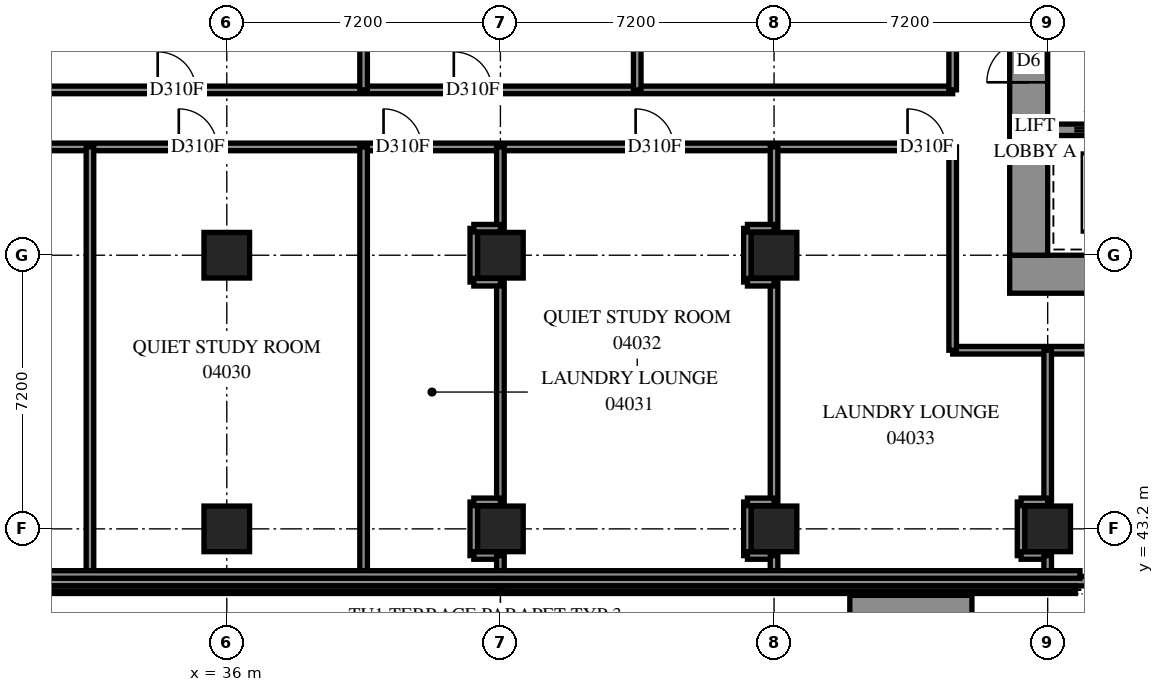
"""IFC4 building model, lengths in metres.
Left out: names, types, materials, properties, quantities, classifications, styles, units other than length and angle.
Written with IfcOpenShell. Run it as: python <this file> out.ifc"""

import sys

from ifc_helpers import new_model, si_unit, direction, frame, frame_2d, origin, origin_2d, place, context, subcontext, project, spatial, polyline, rectangle, outline, extrude, element, fill, save


model = new_model("IFC4")
c1 = context("Model", 3, precision=1e-05, world=origin(), true_north=direction((0.0, 1.0)))
c2 = subcontext(c1, "Body", "Model", "MODEL_VIEW")
j1 = project(units=[si_unit("LENGTHUNIT", "METRE"), si_unit("PLANEANGLEUNIT", "RADIAN")], contexts=[c1])
p1 = place(None, origin())
s1 = spatial("IfcSite", under=j1, at=p1, CompositionType="ELEMENT")
p2 = place(p1, origin())
s2 = spatial("IfcBuilding", under=s1, at=p2, CompositionType="ELEMENT")
p3 = place(p2, frame((0.0, 0.0, 18.6)))
s3 = spatial("IfcBuildingStorey", under=s2, at=p3, CompositionType="ELEMENT", Elevation=18.6)
for number, where, z_axis, x_axis in (
    (1, (36.0, 43.2, 0.0), (0.0, 0.0, 1.0), (1.0, 0.0, 0.0)),
    (2, (36.0, 50.4, 0.0), (0.0, 0.0, 1.0), (1.0, 0.0, 0.0)),
    (3, (43.2, 43.2, 0.0), (0.0, 0.0, 1.0), (1.0, 0.0, 0.0)),
    (4, (43.2, 50.4, 0.0), (0.0, 0.0, 1.0), (1.0, 0.0, 0.0)),
    (5, (50.4, 43.2, 0.0), (0.0, 0.0, 1.0), (1.0, 0.0, 0.0)),
    (6, (50.4, 50.4, 0.0), (0.0, 0.0, 1.0), (1.0, 0.0, 0.0)),
    (7, (57.6, 43.2, 0.0), (0.0, 0.0, 1.0), (1.0, 0.0, 0.0)),
):
    element("IfcColumn", number, at=place(p3, frame(where, z_axis=z_axis, x_axis=x_axis)), inside=s3, PredefinedType="COLUMN", context=c2, shape_type="SweptSolid", body=[
        extrude(rectangle(XDim=1.2, YDim=1.2, at=origin_2d()), origin(), (0.0, 0.0, 1.0), 3.8),
    ])
p4 = place(p3, frame((56.6, 49.9, -0.4), z_axis=(0.0, 0.0, 1.0), x_axis=(1.0, 0.0, 0.0)))
e8 = element("IfcWall", 8, at=p4, inside=s3, PredefinedType="SHEAR", context=c2, shape_type="SweptSolid", body=[
    extrude(rectangle(XDim=16.4, YDim=1.0, at=frame_2d((8.2, 0.0))), origin(), (0.0, 0.0, 1.0), 3.5),
])
p5 = place(p3, frame((57.1, 50.4, -0.4), z_axis=(0.0, 0.0, 1.0), x_axis=(0.0, 1.0, 0.0)))
e9 = element("IfcWall", 9, at=p5, inside=s3, PredefinedType="SHEAR", context=c2, shape_type="SweptSolid", body=[
    extrude(rectangle(XDim=14.4, YDim=1.0, at=frame_2d((7.2, 0.0))), origin(), (0.0, 0.0, 1.0), 3.5),
])
p6 = place(p5, frame((4.55, 0.0, 0.4)))
e10 = element("IfcOpeningElement", 10, at=p6, cuts=e9, PredefinedType="OPENING", context=c2, shape_type="SweptSolid", body=[
    extrude(rectangle(XDim=1.1, YDim=2.1, at=frame_2d((0.55, 1.05))), frame((0.0, 0.51, 0.0), z_axis=(0.0, -1.0, 0.0), x_axis=(1.0, 0.0, 0.0)), (0.0, 0.0, 1.0), 1.02),
])
p7 = place(p5, frame((11.35, 0.0, 0.4)))
e11 = element("IfcOpeningElement", 11, at=p7, cuts=e9, PredefinedType="OPENING", context=c2, shape_type="SweptSolid", body=[
    extrude(rectangle(XDim=1.1, YDim=2.1, at=frame_2d((0.55, 1.05))), frame((0.0, 0.51, 0.0), z_axis=(0.0, -1.0, 0.0), x_axis=(1.0, 0.0, 0.0)), (0.0, 0.0, 1.0), 1.02),
])
p8 = place(p3, frame((57.6, 53.7, 0.0), z_axis=(0.0, 0.0, 1.0), x_axis=(1.0, 0.0, 0.0)))
e12 = element("IfcWall", 12, at=p8, inside=s3, PredefinedType="SOLIDWALL", context=c2, shape_type="SweptSolid", body=[
    extrude(rectangle(XDim=14.4, YDim=0.3, at=frame_2d((7.2, 0.0))), origin(), (0.0, 0.0, 1.0), 3.8),
])
p9 = place(p8, frame((1.25, 0.0, 0.0)))
e13 = element("IfcOpeningElement", 13, at=p9, cuts=e12, PredefinedType="OPENING", context=c2, shape_type="SweptSolid", body=[
    extrude(rectangle(XDim=1.1, YDim=2.1, at=frame_2d((0.55, 1.05))), frame((0.0, 0.16, 0.0), z_axis=(0.0, -1.0, 0.0), x_axis=(1.0, 0.0, 0.0)), (0.0, 0.0, 1.0), 0.32),
])
p10 = place(p8, frame((4.85, 0.0, 0.0)))
e14 = element("IfcOpeningElement", 14, at=p10, cuts=e12, PredefinedType="OPENING", context=c2, shape_type="SweptSolid", body=[
    extrude(rectangle(XDim=1.1, YDim=2.1, at=frame_2d((0.55, 1.05))), frame((0.0, 0.16, 0.0), z_axis=(0.0, -1.0, 0.0), x_axis=(1.0, 0.0, 0.0)), (0.0, 0.0, 1.0), 0.32),
])
p11 = place(p8, frame((8.45, 0.0, 0.0)))
e15 = element("IfcOpeningElement", 15, at=p11, cuts=e12, PredefinedType="OPENING", context=c2, shape_type="SweptSolid", body=[
    extrude(rectangle(XDim=1.1, YDim=2.1, at=frame_2d((0.55, 1.05))), frame((0.0, 0.16, 0.0), z_axis=(0.0, -1.0, 0.0), x_axis=(1.0, 0.0, 0.0)), (0.0, 0.0, 1.0), 0.32),
])
p12 = place(p8, frame((12.05, 0.0, 0.0)))
e16 = element("IfcOpeningElement", 16, at=p12, cuts=e12, PredefinedType="OPENING", context=c2, shape_type="SweptSolid", body=[
    extrude(rectangle(XDim=1.1, YDim=2.1, at=frame_2d((0.55, 1.05))), frame((0.0, 0.16, 0.0), z_axis=(0.0, -1.0, 0.0), x_axis=(1.0, 0.0, 0.0)), (0.0, 0.0, 1.0), 0.32),
])
p13 = place(p3, frame((0.0, 53.25, 0.0), z_axis=(0.0, 0.0, 1.0), x_axis=(1.0, 0.0, 0.0)))
e17 = element("IfcWall", 17, at=p13, inside=s3, PredefinedType="PARTITIONING", context=c2, shape_type="SweptSolid", body=[
    extrude(rectangle(XDim=55.1, YDim=0.2, at=frame_2d((27.55, 0.0))), origin(), (0.0, 0.0, 1.0), 3.8),
])
p14 = place(p13, frame((8.669, 0.0, 0.0)))
e18 = element("IfcOpeningElement", 18, at=p14, cuts=e17, PredefinedType="OPENING", context=c2, shape_type="SweptSolid", body=[
    extrude(rectangle(XDim=1.0, YDim=2.1, at=frame_2d((0.5, 1.05))), frame((0.0, 0.11, 0.0), z_axis=(0.0, -1.0, 0.0), x_axis=(1.0, 0.0, 0.0)), (0.0, 0.0, 1.0), 0.22),
])
p15 = place(p13, frame((11.635, 0.0, 0.0)))
e19 = element("IfcOpeningElement", 19, at=p15, cuts=e17, PredefinedType="OPENING", context=c2, shape_type="SweptSolid", body=[
    extrude(rectangle(XDim=1.0, YDim=2.1, at=frame_2d((0.5, 1.05))), frame((0.0, 0.11, 0.0), z_axis=(0.0, -1.0, 0.0), x_axis=(1.0, 0.0, 0.0)), (0.0, 0.0, 1.0), 0.22),
])
p16 = place(p13, frame((16.165, 0.0, 0.0)))
e20 = element("IfcOpeningElement", 20, at=p16, cuts=e17, PredefinedType="OPENING", context=c2, shape_type="SweptSolid", body=[
    extrude(rectangle(XDim=1.0, YDim=2.1, at=frame_2d((0.5, 1.05))), frame((0.0, 0.11, 0.0), z_axis=(0.0, -1.0, 0.0), x_axis=(1.0, 0.0, 0.0)), (0.0, 0.0, 1.0), 0.22),
])
p17 = place(p13, frame((20.337, 0.0, 0.0)))
e21 = element("IfcOpeningElement", 21, at=p17, cuts=e17, PredefinedType="OPENING", context=c2, shape_type="SweptSolid", body=[
    extrude(rectangle(XDim=1.0, YDim=2.1, at=frame_2d((0.5, 1.05))), frame((0.0, 0.11, 0.0), z_axis=(0.0, -1.0, 0.0), x_axis=(1.0, 0.0, 0.0)), (0.0, 0.0, 1.0), 0.22),
])
p18 = place(p13, frame((27.538, 0.0, 0.0)))
e22 = element("IfcOpeningElement", 22, at=p18, cuts=e17, PredefinedType="OPENING", context=c2, shape_type="SweptSolid", body=[
    extrude(rectangle(XDim=1.0, YDim=2.1, at=frame_2d((0.5, 1.05))), frame((0.0, 0.11, 0.0), z_axis=(0.0, -1.0, 0.0), x_axis=(1.0, 0.0, 0.0)), (0.0, 0.0, 1.0), 0.22),
])
p19 = place(p13, frame((34.737, 0.0, 0.0)))
e23 = element("IfcOpeningElement", 23, at=p19, cuts=e17, PredefinedType="OPENING", context=c2, shape_type="SweptSolid", body=[
    extrude(rectangle(XDim=1.0, YDim=2.1, at=frame_2d((0.5, 1.05))), frame((0.0, 0.11, 0.0), z_axis=(0.0, -1.0, 0.0), x_axis=(1.0, 0.0, 0.0)), (0.0, 0.0, 1.0), 0.22),
])
p20 = place(p13, frame((40.125, 0.0, 0.0)))
e24 = element("IfcOpeningElement", 24, at=p20, cuts=e17, PredefinedType="OPENING", context=c2, shape_type="SweptSolid", body=[
    extrude(rectangle(XDim=1.0, YDim=2.1, at=frame_2d((0.5, 1.05))), frame((0.0, 0.11, 0.0), z_axis=(0.0, -1.0, 0.0), x_axis=(1.0, 0.0, 0.0)), (0.0, 0.0, 1.0), 0.22),
])
p21 = place(p13, frame((46.758, 0.0, 0.0)))
e25 = element("IfcOpeningElement", 25, at=p21, cuts=e17, PredefinedType="OPENING", context=c2, shape_type="SweptSolid", body=[
    extrude(rectangle(XDim=1.0, YDim=2.1, at=frame_2d((0.5, 1.05))), frame((0.0, 0.11, 0.0), z_axis=(0.0, -1.0, 0.0), x_axis=(1.0, 0.0, 0.0)), (0.0, 0.0, 1.0), 0.22),
])
p22 = place(p13, frame((53.913, 0.0, 0.0)))
e26 = element("IfcOpeningElement", 26, at=p22, cuts=e17, PredefinedType="OPENING", context=c2, shape_type="SweptSolid", body=[
    extrude(rectangle(XDim=1.0, YDim=2.1, at=frame_2d((0.5, 1.05))), frame((0.0, 0.11, 0.0), z_axis=(0.0, -1.0, 0.0), x_axis=(1.0, 0.0, 0.0)), (0.0, 0.0, 1.0), 0.22),
])
p23 = place(p13, frame((2.672, 0.0, 0.0)))
e27 = element("IfcOpeningElement", 27, at=p23, cuts=e17, PredefinedType="OPENING", context=c2, shape_type="SweptSolid", body=[
    extrude(rectangle(XDim=1.0, YDim=2.1, at=frame_2d((0.5, 1.05))), frame((0.0, 0.11, 0.0), z_axis=(0.0, -1.0, 0.0), x_axis=(1.0, 0.0, 0.0)), (0.0, 0.0, 1.0), 0.22),
])
p24 = place(p13, frame((4.788, 0.0, 0.0)))
e28 = element("IfcOpeningElement", 28, at=p24, cuts=e17, PredefinedType="OPENING", context=c2, shape_type="SweptSolid", body=[
    extrude(rectangle(XDim=1.0, YDim=2.1, at=frame_2d((0.5, 1.05))), frame((0.0, 0.11, 0.0), z_axis=(0.0, -1.0, 0.0), x_axis=(1.0, 0.0, 0.0)), (0.0, 0.0, 1.0), 0.22),
])
p25 = place(p3, frame((6.0, 54.75, 0.0), z_axis=(0.0, 0.0, 1.0), x_axis=(1.0, 0.0, 0.0)))
e29 = element("IfcWall", 29, at=p25, inside=s3, PredefinedType="PARTITIONING", context=c2, shape_type="SweptSolid", body=[
    extrude(rectangle(XDim=49.1, YDim=0.2, at=frame_2d((24.55, 0.0))), origin(), (0.0, 0.0, 1.0), 3.8),
])
p26 = place(p25, frame((6.284, 0.0, 0.0)))
e30 = element("IfcOpeningElement", 30, at=p26, cuts=e29, PredefinedType="OPENING", context=c2, shape_type="SweptSolid", body=[
    extrude(rectangle(XDim=1.0, YDim=2.1, at=frame_2d((0.5, 1.05))), frame((0.0, 0.11, 0.0), z_axis=(0.0, -1.0, 0.0), x_axis=(1.0, 0.0, 0.0)), (0.0, 0.0, 1.0), 0.22),
])
p27 = place(p25, frame((14.374, 0.0, 0.0)))
e31 = element("IfcOpeningElement", 31, at=p27, cuts=e29, PredefinedType="OPENING", context=c2, shape_type="SweptSolid", body=[
    extrude(rectangle(XDim=1.0, YDim=2.1, at=frame_2d((0.5, 1.05))), frame((0.0, 0.11, 0.0), z_axis=(0.0, -1.0, 0.0), x_axis=(1.0, 0.0, 0.0)), (0.0, 0.0, 1.0), 0.22),
])
p28 = place(p25, frame((19.725, 0.0, 0.0)))
e32 = element("IfcOpeningElement", 32, at=p28, cuts=e29, PredefinedType="OPENING", context=c2, shape_type="SweptSolid", body=[
    extrude(rectangle(XDim=1.0, YDim=2.1, at=frame_2d((0.5, 1.05))), frame((0.0, 0.11, 0.0), z_axis=(0.0, -1.0, 0.0), x_axis=(1.0, 0.0, 0.0)), (0.0, 0.0, 1.0), 0.22),
])
p29 = place(p25, frame((28.183, 0.0, 0.0)))
e33 = element("IfcOpeningElement", 33, at=p29, cuts=e29, PredefinedType="OPENING", context=c2, shape_type="SweptSolid", body=[
    extrude(rectangle(XDim=1.0, YDim=2.1, at=frame_2d((0.5, 1.05))), frame((0.0, 0.11, 0.0), z_axis=(0.0, -1.0, 0.0), x_axis=(1.0, 0.0, 0.0)), (0.0, 0.0, 1.0), 0.22),
])
p30 = place(p25, frame((35.974, 0.0, 0.0)))
e34 = element("IfcOpeningElement", 34, at=p30, cuts=e29, PredefinedType="OPENING", context=c2, shape_type="SweptSolid", body=[
    extrude(rectangle(XDim=1.0, YDim=2.1, at=frame_2d((0.5, 1.05))), frame((0.0, 0.11, 0.0), z_axis=(0.0, -1.0, 0.0), x_axis=(1.0, 0.0, 0.0)), (0.0, 0.0, 1.0), 0.22),
])
p31 = place(p3, frame((55.1, 47.9, 0.0), z_axis=(0.0, 0.0, 1.0), x_axis=(1.0, 0.0, 0.0)))
e35 = element("IfcWall", 35, at=p31, inside=s3, PredefinedType="PARTITIONING", context=c2, shape_type="SweptSolid", body=[
    extrude(rectangle(XDim=19.208, YDim=0.2, at=frame_2d((9.604, 0.0))), origin(), (0.0, 0.0, 1.0), 3.8),
])
p32 = place(p31, frame((6.058, 0.0, 0.0)))
e36 = element("IfcOpeningElement", 36, at=p32, cuts=e35, PredefinedType="OPENING", context=c2, shape_type="SweptSolid", body=[
    extrude(rectangle(XDim=1.0, YDim=2.1, at=frame_2d((0.5, 1.05))), frame((0.0, 0.11, 0.0), z_axis=(0.0, -1.0, 0.0), x_axis=(1.0, 0.0, 0.0)), (0.0, 0.0, 1.0), 0.22),
])
p33 = place(p31, frame((13.258, 0.0, 0.0)))
e37 = element("IfcOpeningElement", 37, at=p33, cuts=e35, PredefinedType="OPENING", context=c2, shape_type="SweptSolid", body=[
    extrude(rectangle(XDim=1.0, YDim=2.1, at=frame_2d((0.5, 1.05))), frame((0.0, 0.11, 0.0), z_axis=(0.0, -1.0, 0.0), x_axis=(1.0, 0.0, 0.0)), (0.0, 0.0, 1.0), 0.22),
])
for number, where, z_axis, x_axis in (
    (38, (32.4, 42.0, 0.0), (0.0, 0.0, 1.0), (0.0, 1.0, 0.0)),
    (39, (39.6, 42.0, 0.0), (0.0, 0.0, 1.0), (0.0, 1.0, 0.0)),
):
    element("IfcWall", number, at=place(p3, frame(where, z_axis=z_axis, x_axis=x_axis)), inside=s3, PredefinedType="PARTITIONING", context=c2, shape_type="SweptSolid", body=[
        extrude(rectangle(XDim=11.25, YDim=0.2, at=frame_2d((5.625, 0.0))), origin(), (0.0, 0.0, 1.0), 3.8),
    ])
for number, where, z_axis, x_axis in (
    (40, (43.2, 43.906, 0.0), (0.0, 0.0, 1.0), (0.0, 1.0, 0.0)),
    (41, (50.4, 43.906, 0.0), (0.0, 0.0, 1.0), (0.0, 1.0, 0.0)),
):
    element("IfcWall", number, at=place(p3, frame(where, z_axis=z_axis, x_axis=x_axis)), inside=s3, PredefinedType="PARTITIONING", context=c2, shape_type="SweptSolid", body=[
        extrude(rectangle(XDim=5.788, YDim=0.2, at=frame_2d((2.894, 0.0))), origin(), (0.0, 0.0, 1.0), 3.8),
    ])
for number, where, z_axis, x_axis in (
    (42, (39.6, 54.75, 0.0), (0.0, 0.0, 1.0), (0.0, 1.0, 0.0)),
    (43, (46.8, 54.75, 0.0), (0.0, 0.0, 1.0), (0.0, 1.0, 0.0)),
):
    element("IfcWall", number, at=place(p3, frame(where, z_axis=z_axis, x_axis=x_axis)), inside=s3, PredefinedType="PARTITIONING", context=c2, shape_type="SweptSolid", body=[
        extrude(rectangle(XDim=5.7, YDim=0.2, at=frame_2d((2.85, 0.0))), origin(), (0.0, 0.0, 1.0), 3.8),
    ])
p34 = place(p3, frame((55.1, 54.752, 0.0), z_axis=(0.0, 0.0, 1.0), x_axis=(0.0, 1.0, 0.0)))
e44 = element("IfcWall", 44, at=p34, inside=s3, PredefinedType="PARTITIONING", context=c2, shape_type="SweptSolid", body=[
    extrude(rectangle(XDim=5.698, YDim=0.2, at=frame_2d((2.849, 0.0))), origin(), (0.0, 0.0, 1.0), 3.8),
])
p35 = place(p3, frame((55.1, 47.9, 0.0), z_axis=(0.0, 0.0, 1.0), x_axis=(0.0, 1.0, 0.0)))
e45 = element("IfcWall", 45, at=p35, inside=s3, PredefinedType="PARTITIONING", context=c2, shape_type="SweptSolid", body=[
    extrude(rectangle(XDim=5.35, YDim=0.2, at=frame_2d((2.675, 0.0))), origin(), (0.0, 0.0, 1.0), 3.8),
])
p36 = place(p3, frame((57.6, 43.906, 0.0), z_axis=(0.0, 0.0, 1.0), x_axis=(0.0, 1.0, 0.0)))
e46 = element("IfcWall", 46, at=p36, inside=s3, PredefinedType="PARTITIONING", context=c2, shape_type="SweptSolid", body=[
    extrude(rectangle(XDim=3.994, YDim=0.2, at=frame_2d((1.997, 0.0))), origin(), (0.0, 0.0, 1.0), 3.8),
])
for number, where, z_axis, x_axis in (
    (47, (43.2, 51.106, 0.0), (0.0, 0.0, 1.0), (0.0, 1.0, 0.0)),
    (48, (50.4, 51.106, 0.0), (0.0, 0.0, 1.0), (0.0, 1.0, 0.0)),
):
    element("IfcWall", number, at=place(p3, frame(where, z_axis=z_axis, x_axis=x_axis)), inside=s3, PredefinedType="PARTITIONING", context=c2, shape_type="SweptSolid", body=[
        extrude(rectangle(XDim=2.144, YDim=0.2, at=frame_2d((1.072, 0.0))), origin(), (0.0, 0.0, 1.0), 3.8),
    ])
for number, where, z_axis, x_axis in (
    (49, (42.5, 49.694, 0.0), (0.0, 0.0, 1.0), (0.0, 1.0, 0.0)),
    (50, (49.7, 49.694, 0.0), (0.0, 0.0, 1.0), (0.0, 1.0, 0.0)),
):
    element("IfcWall", number, at=place(p3, frame(where, z_axis=z_axis, x_axis=x_axis)), inside=s3, PredefinedType="PARTITIONING", context=c2, shape_type="SweptSolid", body=[
        extrude(rectangle(XDim=1.412, YDim=0.2, at=frame_2d((0.706, 0.0))), origin(), (0.0, 0.0, 1.0), 3.8),
    ])
for number, where, z_axis, x_axis in (
    (51, (42.5, 42.496, 0.0), (0.0, 0.0, 1.0), (0.0, 1.0, 0.0)),
    (52, (49.7, 42.496, 0.0), (0.0, 0.0, 1.0), (0.0, 1.0, 0.0)),
    (53, (56.9, 42.496, 0.0), (0.0, 0.0, 1.0), (0.0, 1.0, 0.0)),
):
    element("IfcWall", number, at=place(p3, frame(where, z_axis=z_axis, x_axis=x_axis)), inside=s3, PredefinedType="PARTITIONING", context=c2, shape_type="SweptSolid", body=[
        extrude(rectangle(XDim=1.41, YDim=0.2, at=frame_2d((0.705, 0.0))), origin(), (0.0, 0.0, 1.0), 3.8),
    ])
for number, where, z_axis, x_axis in (
    (54, (42.5, 51.11, 0.0), (0.0, 0.0, 1.0), (1.0, 0.0, 0.0)),
    (55, (42.5, 49.69, 0.0), (0.0, 0.0, 1.0), (1.0, 0.0, 0.0)),
    (56, (42.5, 43.91, 0.0), (0.0, 0.0, 1.0), (1.0, 0.0, 0.0)),
    (57, (56.9, 43.91, 0.0), (0.0, 0.0, 1.0), (1.0, 0.0, 0.0)),
    (58, (42.5, 42.5, 0.0), (0.0, 0.0, 1.0), (1.0, 0.0, 0.0)),
    (59, (56.9, 42.5, 0.0), (0.0, 0.0, 1.0), (1.0, 0.0, 0.0)),
    (60, (49.7, 51.11, 0.0), (0.0, 0.0, 1.0), (1.0, 0.0, 0.0)),
    (61, (49.7, 49.69, 0.0), (0.0, 0.0, 1.0), (1.0, 0.0, 0.0)),
    (62, (49.7, 43.91, 0.0), (0.0, 0.0, 1.0), (1.0, 0.0, 0.0)),
    (63, (49.7, 42.5, 0.0), (0.0, 0.0, 1.0), (1.0, 0.0, 0.0)),
):
    element("IfcWall", number, at=place(p3, frame(where, z_axis=z_axis, x_axis=x_axis)), inside=s3, PredefinedType="PARTITIONING", context=c2, shape_type="SweptSolid", body=[
        extrude(rectangle(XDim=0.7, YDim=0.2, at=frame_2d((0.35, 0.0))), origin(), (0.0, 0.0, 1.0), 3.8),
    ])
for number, where, z_axis, x_axis in (
    (64, (43.2, 42.0, 0.0), (0.0, 0.0, 1.0), (0.0, 1.0, 0.0)),
    (65, (50.4, 42.0, 0.0), (0.0, 0.0, 1.0), (0.0, 1.0, 0.0)),
    (66, (57.6, 42.0, 0.0), (0.0, 0.0, 1.0), (0.0, 1.0, 0.0)),
):
    element("IfcWall", number, at=place(p3, frame(where, z_axis=z_axis, x_axis=x_axis)), inside=s3, PredefinedType="PARTITIONING", context=c2, shape_type="SweptSolid", body=[
        extrude(rectangle(XDim=0.496, YDim=0.2, at=frame_2d((0.248, 0.0))), origin(), (0.0, 0.0, 1.0), 3.8),
    ])
p37 = place(p3, frame((71.925, 41.825, 0.0), z_axis=(0.0, 0.0, 1.0), x_axis=(-1.0, 0.0, 0.0)))
e67 = element("IfcWall", 67, at=p37, inside=s3, PredefinedType="SOLIDWALL", context=c2, shape_type="SweptSolid", body=[
    extrude(rectangle(XDim=57.45, YDim=0.25, at=frame_2d((28.725, 0.0))), origin(), (0.0, 0.0, 1.0), 3.8),
])
p38 = place(p37, frame((12.325, 0.0, 0.0)))
e68 = element("IfcOpeningElement", 68, at=p38, cuts=e67, PredefinedType="OPENING", context=c2, shape_type="SweptSolid", body=[
    extrude(rectangle(XDim=1.0, YDim=2.1, at=frame_2d((0.5, 1.05))), frame((0.0, 0.135, 0.0), z_axis=(0.0, -1.0, 0.0), x_axis=(1.0, 0.0, 0.0)), (0.0, 0.0, 1.0), 0.27),
])
p39 = place(p37, frame((44.125, 0.0, 0.0)))
e69 = element("IfcOpeningElement", 69, at=p39, cuts=e67, PredefinedType="OPENING", context=c2, shape_type="SweptSolid", body=[
    extrude(rectangle(XDim=1.0, YDim=2.1, at=frame_2d((0.5, 1.05))), frame((0.0, 0.135, 0.0), z_axis=(0.0, -1.0, 0.0), x_axis=(1.0, 0.0, 0.0)), (0.0, 0.0, 1.0), 0.27),
])
p40 = place(p3, frame((27.95, 42.0, 0.0), z_axis=(0.0, 0.0, 1.0), x_axis=(1.0, 0.0, 0.0)))
e70 = element("IfcWall", 70, at=p40, inside=s3, PredefinedType="PARTITIONING", context=c2, shape_type="SweptSolid", body=[
    extrude(outline(polyline([(0.0, -0.1), (30.5, -0.1), (30.5, 0.1), (0.0, 0.1), (0.0, -0.1)])), origin(), (0.0, 0.0, 1.0), 3.8),
])
p41 = place(p3, frame((58.33, 41.6, 0.0), z_axis=(0.0, 0.0, 1.0), x_axis=(-1.0, 0.0, 0.0)))
e71 = element("IfcWall", 71, at=p41, inside=s3, PredefinedType="PARAPET", context=c2, shape_type="SweptSolid", body=[
    extrude(outline(polyline([(0.0, -0.1), (30.26, -0.1), (30.26, 0.1), (0.0, 0.1), (0.0, -0.1)])), origin(), (0.0, 0.0, 1.0), 0.25),
])
p42 = place(p3, frame((55.607, 41.05, 0.0), z_axis=(0.0, 0.0, 1.0), x_axis=(-1.0, 0.0, 0.0)))
e72 = element("IfcWall", 72, at=p42, inside=s3, PredefinedType="SOLIDWALL", context=c2, shape_type="SweptSolid", body=[
    extrude(outline(polyline([(0.0, -0.4), (3.214, -0.4), (3.214, 0.4), (0.0, 0.4), (0.0, -0.4)])), origin(), (0.0, 0.0, 1.0), 0.65),
])
p43 = place(p6, origin())
e73 = element("IfcDoor", 73, at=p43, inside=s3, OperationType="DOUBLE_DOOR_SINGLE_SWING", PredefinedType="DOOR", context=c2, shape_type="SweptSolid", body=[
    extrude(rectangle(XDim=1.1, YDim=2.1, at=frame_2d((0.55, 1.05))), frame((0.0, 0.025, 0.0), z_axis=(0.0, -1.0, 0.0), x_axis=(1.0, 0.0, 0.0)), (0.0, 0.0, 1.0), 0.05),
])
fill(e10, e73)
p44 = place(p19, origin())
e74 = element("IfcDoor", 74, at=p44, inside=s3, OperationType="SINGLE_SWING_RIGHT", PredefinedType="DOOR", context=c2, shape_type="SweptSolid", body=[
    extrude(rectangle(XDim=1.0, YDim=2.1, at=frame_2d((0.5, 1.05))), frame((0.0, 0.025, 0.0), z_axis=(0.0, -1.0, 0.0), x_axis=(1.0, 0.0, 0.0)), (0.0, 0.0, 1.0), 0.05),
])
fill(e23, e74)
p45 = place(p20, origin())
e75 = element("IfcDoor", 75, at=p45, inside=s3, OperationType="SINGLE_SWING_RIGHT", PredefinedType="DOOR", context=c2, shape_type="SweptSolid", body=[
    extrude(rectangle(XDim=1.0, YDim=2.1, at=frame_2d((0.5, 1.05))), frame((0.0, 0.025, 0.0), z_axis=(0.0, -1.0, 0.0), x_axis=(1.0, 0.0, 0.0)), (0.0, 0.0, 1.0), 0.05),
])
fill(e24, e75)
p46 = place(p21, origin())
e76 = element("IfcDoor", 76, at=p46, inside=s3, OperationType="SINGLE_SWING_LEFT", PredefinedType="DOOR", context=c2, shape_type="SweptSolid", body=[
    extrude(rectangle(XDim=1.0, YDim=2.1, at=frame_2d((0.5, 1.05))), frame((0.0, 0.025, 0.0), z_axis=(0.0, -1.0, 0.0), x_axis=(1.0, 0.0, 0.0)), (0.0, 0.0, 1.0), 0.05),
])
fill(e25, e76)
p47 = place(p22, origin())
e77 = element("IfcDoor", 77, at=p47, inside=s3, OperationType="SINGLE_SWING_LEFT", PredefinedType="DOOR", context=c2, shape_type="SweptSolid", body=[
    extrude(rectangle(XDim=1.0, YDim=2.1, at=frame_2d((0.5, 1.05))), frame((0.0, 0.025, 0.0), z_axis=(0.0, -1.0, 0.0), x_axis=(1.0, 0.0, 0.0)), (0.0, 0.0, 1.0), 0.05),
])
fill(e26, e77)
p48 = place(p29, origin())
e78 = element("IfcDoor", 78, at=p48, inside=s3, OperationType="SINGLE_SWING_RIGHT", PredefinedType="DOOR", context=c2, shape_type="SweptSolid", body=[
    extrude(rectangle(XDim=1.0, YDim=2.1, at=frame_2d((0.5, 1.05))), frame((0.0, 0.025, 0.0), z_axis=(0.0, -1.0, 0.0), x_axis=(1.0, 0.0, 0.0)), (0.0, 0.0, 1.0), 0.05),
])
fill(e33, e78)
p49 = place(p30, origin())
e79 = element("IfcDoor", 79, at=p49, inside=s3, OperationType="SINGLE_SWING_LEFT", PredefinedType="DOOR", context=c2, shape_type="SweptSolid", body=[
    extrude(rectangle(XDim=1.0, YDim=2.1, at=frame_2d((0.5, 1.05))), frame((0.0, 0.025, 0.0), z_axis=(0.0, -1.0, 0.0), x_axis=(1.0, 0.0, 0.0)), (0.0, 0.0, 1.0), 0.05),
])
fill(e34, e79)
save(model, sys.argv[1])
